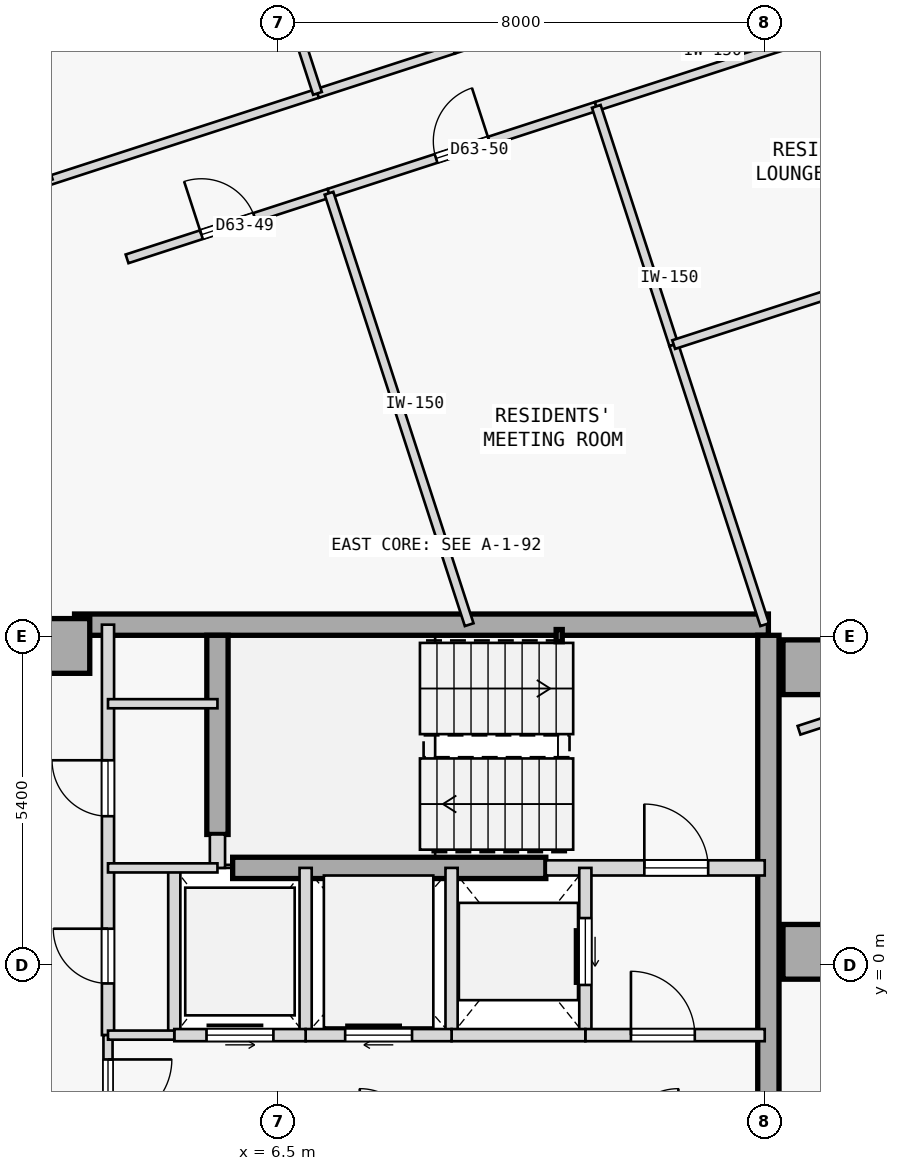
"""IFC4 building model, lengths in metres.
Left out: names, types, materials, properties, quantities, classifications, styles, units other than length and angle.
Written with IfcOpenShell. Run it as: python <this file> out.ifc"""

import sys

from ifc_helpers import new_model, si_unit, direction, frame, frame_2d, origin, origin_2d, place, context, subcontext, project, spatial, rectangle, hollow_rectangle, extrude, element, fill, save


model = new_model("IFC4")
c1 = context("Model", 3, precision=1e-05, world=origin(), true_north=direction((0.0, 1.0)))
c2 = subcontext(c1, "Body", "Model", "MODEL_VIEW")
j1 = project(units=[si_unit("LENGTHUNIT", "METRE"), si_unit("PLANEANGLEUNIT", "RADIAN")], contexts=[c1])
p1 = place(None, origin())
s1 = spatial("IfcSite", under=j1, at=p1, CompositionType="ELEMENT")
p2 = place(p1, origin())
s2 = spatial("IfcBuilding", under=s1, at=p2, CompositionType="ELEMENT")
p3 = place(p2, frame((0.0, 0.0, 237.7)))
s3 = spatial("IfcBuildingStorey", under=s2, at=p3, CompositionType="ELEMENT", Elevation=237.7)
for number, where, z_axis, x_axis in (
    (1, (15.25, 4.9, 0.0), (0.0, 0.0, 1.0), (1.0, 0.0, 0.0)),
    (2, (15.25, 0.22, 0.0), (0.0, 0.0, 1.0), (1.0, 0.0, 0.0)),
    (3, (2.95, 5.25, 0.0), (0.0, 0.0, 1.0), (1.0, 0.0, 0.0)),
):
    element("IfcColumn", number, at=place(p3, frame(where, z_axis=z_axis, x_axis=x_axis)), inside=s3, PredefinedType="COLUMN", context=c2, shape_type="SweptSolid", body=[
        extrude(rectangle(XDim=0.9, YDim=0.9, at=origin_2d()), origin(), (0.0, 0.0, 1.0), 3.35),
    ])
p4 = place(p3, frame((3.15, 5.6, 0.0), z_axis=(0.0, 0.0, 1.0), x_axis=(1.0, 0.0, 0.0)))
e4 = element("IfcWall", 4, at=p4, inside=s3, PredefinedType="SHEAR", context=c2, shape_type="SweptSolid", body=[
    extrude(rectangle(XDim=11.41, YDim=0.35, at=frame_2d((5.705, 0.0))), origin(), (0.0, 0.0, 1.0), 3.125),
])
p5 = place(p3, frame((14.56, -5.425, 0.0), z_axis=(0.0, 0.0, 1.0), x_axis=(0.0, 1.0, 0.0)))
e5 = element("IfcWall", 5, at=p5, inside=s3, PredefinedType="SHEAR", context=c2, shape_type="SweptSolid", body=[
    extrude(rectangle(XDim=10.85, YDim=0.35, at=frame_2d((5.425, 0.0))), origin(), (0.0, 0.0, 1.0), 3.125),
])
p6 = place(p3, frame((5.5, 2.15, 0.0), z_axis=(0.0, 0.0, 1.0), x_axis=(0.0, 1.0, 0.0)))
e6 = element("IfcWall", 6, at=p6, inside=s3, PredefinedType="SHEAR", context=c2, shape_type="SweptSolid", body=[
    extrude(rectangle(XDim=3.275, YDim=0.35, at=frame_2d((1.638, 0.0))), origin(), (0.0, 0.0, 1.0), 3.125),
])
p7 = place(p3, frame((5.75, 1.6, 0.0), z_axis=(0.0, 0.0, 1.0), x_axis=(1.0, 0.0, 0.0)))
e7 = element("IfcWall", 7, at=p7, inside=s3, PredefinedType="SHEAR", context=c2, shape_type="SweptSolid", body=[
    extrude(rectangle(XDim=5.15, YDim=0.35, at=frame_2d((2.575, 0.0))), origin(), (0.0, 0.0, 1.0), 3.125),
])
p8 = place(p3, frame((11.12, 5.42, 0.0), z_axis=(0.0, 0.0, 1.0), x_axis=(1.0, 0.0, 0.0)))
e8 = element("IfcColumn", 8, at=p8, inside=s3, PredefinedType="COLUMN", context=c2, shape_type="SweptSolid", body=[
    extrude(hollow_rectangle(XDim=0.1, YDim=0.2, WallThickness=0.008, at=origin_2d()), origin(), (0.0, 0.0, 1.0), 3.35),
])
p9 = place(p3, frame((10.9, 1.6, 0.0), z_axis=(0.0, 0.0, 1.0), x_axis=(1.0, 0.0, 0.0)))
e9 = element("IfcWall", 9, at=p9, inside=s3, PredefinedType="STANDARD", context=c2, shape_type="SweptSolid", body=[
    extrude(rectangle(XDim=3.6, YDim=0.25, at=frame_2d((1.8, 0.0))), origin(), (0.0, 0.0, 1.0), 3.125),
])
p10 = place(p9, frame((1.62, 0.0, 0.0)))
e10 = element("IfcOpeningElement", 10, at=p10, cuts=e9, PredefinedType="OPENING", context=c2, shape_type="SweptSolid", body=[
    extrude(rectangle(XDim=1.05, YDim=2.15, at=frame_2d((0.525, 1.075))), frame((0.0, 0.135, 0.0), z_axis=(0.0, -1.0, 0.0), x_axis=(1.0, 0.0, 0.0)), (0.0, 0.0, 1.0), 0.27),
])
p11 = place(p3, frame((5.5, 1.6, 0.0), z_axis=(0.0, 0.0, 1.0), x_axis=(0.0, 1.0, 0.0)))
e11 = element("IfcWall", 11, at=p11, inside=s3, PredefinedType="STANDARD", context=c2, shape_type="SweptSolid", body=[
    extrude(rectangle(XDim=0.55, YDim=0.25, at=frame_2d((0.275, 0.0))), origin(), (0.0, 0.0, 1.0), 3.125),
])
p12 = place(p3, frame((3.7, -1.15, 0.0), z_axis=(0.0, 0.0, 1.0), x_axis=(0.0, 1.0, 0.0)))
e12 = element("IfcWall", 12, at=p12, inside=s3, PredefinedType="STANDARD", context=c2, shape_type="SweptSolid", body=[
    extrude(rectangle(XDim=6.75, YDim=0.2, at=frame_2d((3.375, 0.0))), origin(), (0.0, 0.0, 1.0), 3.125),
])
p13 = place(p12, frame((3.6, 0.0, 0.0)))
e13 = element("IfcOpeningElement", 13, at=p13, cuts=e12, PredefinedType="OPENING", context=c2, shape_type="SweptSolid", body=[
    extrude(rectangle(XDim=0.92, YDim=2.15, at=frame_2d((0.46, 1.075))), frame((0.0, 0.11, 0.0), z_axis=(0.0, -1.0, 0.0), x_axis=(1.0, 0.0, 0.0)), (0.0, 0.0, 1.0), 0.22),
])
p14 = place(p12, frame((0.85, 0.0, 0.0)))
e14 = element("IfcOpeningElement", 14, at=p14, cuts=e12, PredefinedType="OPENING", context=c2, shape_type="SweptSolid", body=[
    extrude(rectangle(XDim=0.9, YDim=2.15, at=frame_2d((0.45, 1.075))), frame((0.0, 0.11, 0.0), z_axis=(0.0, -1.0, 0.0), x_axis=(1.0, 0.0, 0.0)), (0.0, 0.0, 1.0), 0.22),
])
p15 = place(p3, frame((3.7, -2.95, 0.0), z_axis=(0.0, 0.0, 1.0), x_axis=(0.0, 1.0, 0.0)))
e15 = element("IfcWall", 15, at=p15, inside=s3, PredefinedType="PARTITIONING", context=c2, shape_type="SweptSolid", body=[
    extrude(rectangle(XDim=1.8, YDim=0.15, at=frame_2d((0.9, 0.0))), origin(), (0.0, 0.0, 1.0), 3.125),
])
p16 = place(p15, frame((0.35, 0.0, 0.0)))
e16 = element("IfcOpeningElement", 16, at=p16, cuts=e15, PredefinedType="OPENING", context=c2, shape_type="SweptSolid", body=[
    extrude(rectangle(XDim=1.05, YDim=2.18, at=frame_2d((0.525, 1.09))), frame((0.0, 0.085, 0.0), z_axis=(0.0, -1.0, 0.0), x_axis=(1.0, 0.0, 0.0)), (0.0, 0.0, 1.0), 0.17),
])
p17 = place(p3, frame((11.55, -1.15, 0.0), z_axis=(0.0, 0.0, 1.0), x_axis=(0.0, 1.0, 0.0)))
e17 = element("IfcWall", 17, at=p17, inside=s3, PredefinedType="STANDARD", context=c2, shape_type="SweptSolid", body=[
    extrude(rectangle(XDim=2.75, YDim=0.2, at=frame_2d((1.375, 0.0))), origin(), (0.0, 0.0, 1.0), 3.125),
])
p18 = place(p17, frame((0.825, 0.0, 0.0)))
e18 = element("IfcOpeningElement", 18, at=p18, cuts=e17, PredefinedType="OPENING", context=c2, shape_type="SweptSolid", body=[
    extrude(rectangle(XDim=1.1, YDim=2.15, at=frame_2d((0.55, 1.075))), frame((0.0, 0.11, 0.0), z_axis=(0.0, -1.0, 0.0), x_axis=(1.0, 0.0, 0.0)), (0.0, 0.0, 1.0), 0.22),
])
p19 = place(p3, frame((9.35, -1.15, 0.0), z_axis=(0.0, 0.0, 1.0), x_axis=(0.0, 1.0, 0.0)))
e19 = element("IfcWall", 19, at=p19, inside=s3, PredefinedType="STANDARD", context=c2, shape_type="SweptSolid", body=[
    extrude(rectangle(XDim=2.75, YDim=0.2, at=frame_2d((1.375, 0.0))), origin(), (0.0, 0.0, 1.0), 3.125),
])
p20 = place(p3, frame((11.55, -1.15, 0.0), z_axis=(0.0, 0.0, 1.0), x_axis=(1.0, 0.0, 0.0)))
e20 = element("IfcWall", 20, at=p20, inside=s3, PredefinedType="STANDARD", context=c2, shape_type="SweptSolid", body=[
    extrude(rectangle(XDim=2.95, YDim=0.2, at=frame_2d((1.475, 0.0))), origin(), (0.0, 0.0, 1.0), 3.125),
])
p21 = place(p20, frame((0.75, 0.0, 0.0)))
e21 = element("IfcOpeningElement", 21, at=p21, cuts=e20, PredefinedType="OPENING", context=c2, shape_type="SweptSolid", body=[
    extrude(rectangle(XDim=1.05, YDim=2.18, at=frame_2d((0.525, 1.09))), frame((0.0, 0.11, 0.0), z_axis=(0.0, -1.0, 0.0), x_axis=(1.0, 0.0, 0.0)), (0.0, 0.0, 1.0), 0.22),
])
p22 = place(p3, frame((9.35, -1.15, 0.0), z_axis=(0.0, 0.0, 1.0), x_axis=(1.0, 0.0, 0.0)))
e22 = element("IfcWall", 22, at=p22, inside=s3, PredefinedType="STANDARD", context=c2, shape_type="SweptSolid", body=[
    extrude(rectangle(XDim=2.2, YDim=0.2, at=frame_2d((1.1, 0.0))), origin(), (0.0, 0.0, 1.0), 3.125),
])
p23 = place(p3, frame((6.95, -1.15, 0.0), z_axis=(0.0, 0.0, 1.0), x_axis=(0.0, 1.0, 0.0)))
e23 = element("IfcWall", 23, at=p23, inside=s3, PredefinedType="STANDARD", context=c2, shape_type="SweptSolid", body=[
    extrude(rectangle(XDim=2.75, YDim=0.2, at=frame_2d((1.375, 0.0))), origin(), (0.0, 0.0, 1.0), 3.125),
])
p24 = place(p3, frame((6.95, -1.15, 0.0), z_axis=(0.0, 0.0, 1.0), x_axis=(1.0, 0.0, 0.0)))
e24 = element("IfcWall", 24, at=p24, inside=s3, PredefinedType="STANDARD", context=c2, shape_type="SweptSolid", body=[
    extrude(rectangle(XDim=2.4, YDim=0.2, at=frame_2d((1.2, 0.0))), origin(), (0.0, 0.0, 1.0), 3.125),
])
p25 = place(p24, frame((0.65, 0.0, 0.0)))
e25 = element("IfcOpeningElement", 25, at=p25, cuts=e24, PredefinedType="OPENING", context=c2, shape_type="SweptSolid", body=[
    extrude(rectangle(XDim=1.1, YDim=2.15, at=frame_2d((0.55, 1.075))), frame((0.0, 0.11, 0.0), z_axis=(0.0, -1.0, 0.0), x_axis=(1.0, 0.0, 0.0)), (0.0, 0.0, 1.0), 0.22),
])
p26 = place(p3, frame((4.79, -1.15, 0.0), z_axis=(0.0, 0.0, 1.0), x_axis=(0.0, 1.0, 0.0)))
e26 = element("IfcWall", 26, at=p26, inside=s3, PredefinedType="STANDARD", context=c2, shape_type="SweptSolid", body=[
    extrude(rectangle(XDim=2.75, YDim=0.2, at=frame_2d((1.375, 0.0))), origin(), (0.0, 0.0, 1.0), 3.125),
])
p27 = place(p3, frame((4.79, -1.15, 0.0), z_axis=(0.0, 0.0, 1.0), x_axis=(1.0, 0.0, 0.0)))
e27 = element("IfcWall", 27, at=p27, inside=s3, PredefinedType="STANDARD", context=c2, shape_type="SweptSolid", body=[
    extrude(rectangle(XDim=2.16, YDim=0.2, at=frame_2d((1.08, 0.0))), origin(), (0.0, 0.0, 1.0), 3.125),
])
p28 = place(p27, frame((0.53, 0.0, 0.0)))
e28 = element("IfcOpeningElement", 28, at=p28, cuts=e27, PredefinedType="OPENING", context=c2, shape_type="SweptSolid", body=[
    extrude(rectangle(XDim=1.1, YDim=2.15, at=frame_2d((0.55, 1.075))), frame((0.0, 0.11, 0.0), z_axis=(0.0, -1.0, 0.0), x_axis=(1.0, 0.0, 0.0)), (0.0, 0.0, 1.0), 0.22),
])
p29 = place(p3, frame((3.7, -1.15, 0.0), z_axis=(0.0, 0.0, 1.0), x_axis=(1.0, 0.0, 0.0)))
e29 = element("IfcWall", 29, at=p29, inside=s3, PredefinedType="PARTITIONING", context=c2, shape_type="SweptSolid", body=[
    extrude(rectangle(XDim=1.09, YDim=0.15, at=frame_2d((0.545, 0.0))), origin(), (0.0, 0.0, 1.0), 3.125),
])
for number, where, z_axis, x_axis in (
    (30, (3.7, 4.3, 0.0), (0.0, 0.0, 1.0), (1.0, 0.0, 0.0)),
    (31, (3.7, 1.6, 0.0), (0.0, 0.0, 1.0), (1.0, 0.0, 0.0)),
):
    element("IfcWall", number, at=place(p3, frame(where, z_axis=z_axis, x_axis=x_axis)), inside=s3, PredefinedType="PARTITIONING", context=c2, shape_type="SweptSolid", body=[
        extrude(rectangle(XDim=1.8, YDim=0.15, at=frame_2d((0.9, 0.0))), origin(), (0.0, 0.0, 1.0), 3.125),
    ])
p30 = place(p3, frame((2.719, 12.898, 0.0), z_axis=(0.0, 0.0, 1.0), x_axis=(0.951053341802, 0.309026764289, 0.0)))
e32 = element("IfcWall", 32, at=p30, inside=s3, PredefinedType="PARTITIONING", context=c2, shape_type="SweptSolid", body=[
    extrude(rectangle(XDim=4.654, YDim=0.15, at=frame_2d((2.327, 0.0))), origin(), (0.0, 0.0, 1.0), 3.125),
])
p31 = place(p3, frame((7.145, 14.337, 0.0), z_axis=(0.0, 0.0, 1.0), x_axis=(0.951045519245, 0.309050837767, 0.0)))
e33 = element("IfcWall", 33, at=p31, inside=s3, PredefinedType="PARTITIONING", context=c2, shape_type="SweptSolid", body=[
    extrude(rectangle(XDim=2.35, YDim=0.15, at=frame_2d((1.175, 0.0))), origin(), (0.0, 0.0, 1.0), 3.125),
])
p32 = place(p3, frame((9.38, 15.063, 0.0), z_axis=(0.0, 0.0, 1.0), x_axis=(0.951069122051, 0.308978195154, 0.0)))
e34 = element("IfcWall", 34, at=p32, inside=s3, PredefinedType="PARTITIONING", context=c2, shape_type="SweptSolid", body=[
    extrude(rectangle(XDim=4.35, YDim=0.15, at=frame_2d((2.175, 0.0))), origin(), (0.0, 0.0, 1.0), 3.125),
])
p33 = place(p3, frame((4.013, 11.616, 0.0), z_axis=(0.0, 0.0, 1.0), x_axis=(0.951054104561, 0.309024416831, 0.0)))
e35 = element("IfcWall", 35, at=p33, inside=s3, PredefinedType="PARTITIONING", context=c2, shape_type="SweptSolid", body=[
    extrude(rectangle(XDim=3.492, YDim=0.15, at=frame_2d((1.746, 0.0))), origin(), (0.0, 0.0, 1.0), 3.125),
])
p34 = place(p33, frame((1.286, 0.0, 0.0)))
e36 = element("IfcOpeningElement", 36, at=p34, cuts=e35, PredefinedType="OPENING", context=c2, shape_type="SweptSolid", body=[
    extrude(rectangle(XDim=0.92, YDim=2.15, at=frame_2d((0.46, 1.075))), frame((0.0, 0.085, 0.0), z_axis=(0.0, -1.0, 0.0), x_axis=(1.0, 0.0, 0.0)), (0.0, 0.0, 1.0), 0.17),
])
p35 = place(p3, frame((7.334, 12.695, 0.0), z_axis=(0.0, 0.0, 1.0), x_axis=(0.951043772533, 0.30905621289, 0.0)))
e37 = element("IfcWall", 37, at=p35, inside=s3, PredefinedType="PARTITIONING", context=c2, shape_type="SweptSolid", body=[
    extrude(rectangle(XDim=4.622, YDim=0.15, at=frame_2d((2.311, 0.0))), origin(), (0.0, 0.0, 1.0), 3.125),
])
p36 = place(p35, frame((1.851, 0.0, 0.0)))
e38 = element("IfcOpeningElement", 38, at=p36, cuts=e37, PredefinedType="OPENING", context=c2, shape_type="SweptSolid", body=[
    extrude(rectangle(XDim=0.92, YDim=2.15, at=frame_2d((0.46, 1.075))), frame((0.0, 0.085, 0.0), z_axis=(0.0, -1.0, 0.0), x_axis=(1.0, 0.0, 0.0)), (0.0, 0.0, 1.0), 0.17),
])
p37 = place(p3, frame((11.73, 14.123, 0.0), z_axis=(0.0, 0.0, 1.0), x_axis=(0.951060263663, 0.309005460926, 0.0)))
e39 = element("IfcWall", 39, at=p37, inside=s3, PredefinedType="PARTITIONING", context=c2, shape_type="SweptSolid", body=[
    extrude(rectangle(XDim=12.327, YDim=0.15, at=frame_2d((6.164, 0.0))), origin(), (0.0, 0.0, 1.0), 3.125),
])
p38 = place(p37, frame((5.704, 0.0, 0.0)))
e40 = element("IfcOpeningElement", 40, at=p38, cuts=e39, PredefinedType="OPENING", context=c2, shape_type="SweptSolid", body=[
    extrude(rectangle(XDim=0.92, YDim=2.15, at=frame_2d((0.46, 1.075))), frame((0.0, 0.085, 0.0), z_axis=(0.0, -1.0, 0.0), x_axis=(1.0, 0.0, 0.0)), (0.0, 0.0, 1.0), 0.17),
])
p39 = place(p3, frame((2.719, 12.898, 0.0), z_axis=(0.0, 0.0, 1.0), x_axis=(-0.308998913866, 0.951062390819, 0.0)))
e41 = element("IfcWall", 41, at=p39, inside=s3, PredefinedType="PARTITIONING", context=c2, shape_type="SweptSolid", body=[
    extrude(rectangle(XDim=7.284, YDim=0.15, at=frame_2d((3.642, 0.0))), origin(), (0.0, 0.0, 1.0), 3.125),
])
p40 = place(p3, frame((7.145, 14.337, 0.0), z_axis=(0.0, 0.0, 1.0), x_axis=(-0.308948390121, 0.951078804433, 0.0)))
e42 = element("IfcWall", 42, at=p40, inside=s3, PredefinedType="PARTITIONING", context=c2, shape_type="SweptSolid", body=[
    extrude(rectangle(XDim=2.005, YDim=0.15, at=frame_2d((1.002, 0.0))), origin(), (0.0, 0.0, 1.0), 3.125),
])
p41 = place(p3, frame((9.64, 5.6, 0.0), z_axis=(0.0, 0.0, 1.0), x_axis=(-0.309012069377, 0.95105811651, 0.0)))
e43 = element("IfcWall", 43, at=p41, inside=s3, PredefinedType="PARTITIONING", context=c2, shape_type="SweptSolid", body=[
    extrude(rectangle(XDim=7.46, YDim=0.15, at=frame_2d((3.73, 0.0))), origin(), (0.0, 0.0, 1.0), 3.125),
])
p42 = place(p3, frame((14.5, 5.6, 0.0), z_axis=(0.0, 0.0, 1.0), x_axis=(-0.308974360462, 0.951070367837, 0.0)))
e44 = element("IfcWall", 44, at=p42, inside=s3, PredefinedType="PARTITIONING", context=c2, shape_type="SweptSolid", body=[
    extrude(rectangle(XDim=4.843, YDim=0.15, at=frame_2d((2.421, 0.0))), origin(), (0.0, 0.0, 1.0), 3.125),
])
p43 = place(p3, frame((13.003, 10.206, 0.0), z_axis=(0.0, 0.0, 1.0), x_axis=(-0.309035144366, 0.951050618814, 0.0)))
e45 = element("IfcWall", 45, at=p43, inside=s3, PredefinedType="PARTITIONING", context=c2, shape_type="SweptSolid", body=[
    extrude(rectangle(XDim=4.119, YDim=0.15, at=frame_2d((2.06, 0.0))), origin(), (0.0, 0.0, 1.0), 3.125),
])
p44 = place(p3, frame((15.064, 3.863, 0.0), z_axis=(0.0, 0.0, 1.0), x_axis=(0.951061448945, 0.309001812827, 0.0)))
e46 = element("IfcWall", 46, at=p44, inside=s3, PredefinedType="PARTITIONING", context=c2, shape_type="SweptSolid", body=[
    extrude(rectangle(XDim=10.352, YDim=0.15, at=frame_2d((5.176, 0.0))), origin(), (0.0, 0.0, 1.0), 3.125),
])
p45 = place(p44, frame((4.716, 0.0, 0.0)))
e47 = element("IfcOpeningElement", 47, at=p45, cuts=e46, PredefinedType="OPENING", context=c2, shape_type="SweptSolid", body=[
    extrude(rectangle(XDim=0.92, YDim=2.15, at=frame_2d((0.46, 1.075))), frame((0.0, 0.085, 0.0), z_axis=(0.0, -1.0, 0.0), x_axis=(1.0, 0.0, 0.0)), (0.0, 0.0, 1.0), 0.17),
])
p46 = place(p3, frame((13.003, 10.206, 0.0), z_axis=(0.0, 0.0, 1.0), x_axis=(0.951060263663, 0.309005460926, 0.0)))
e48 = element("IfcWall", 48, at=p46, inside=s3, PredefinedType="PARTITIONING", context=c2, shape_type="SweptSolid", body=[
    extrude(rectangle(XDim=12.327, YDim=0.15, at=frame_2d((6.164, 0.0))), origin(), (0.0, 0.0, 1.0), 2.675),
])
p47 = place(p10, origin())
e49 = element("IfcDoor", 49, at=p47, inside=s3, OperationType="SINGLE_SWING_LEFT", PredefinedType="DOOR", context=c2, shape_type="SweptSolid", body=[
    extrude(rectangle(XDim=1.05, YDim=2.15, at=frame_2d((0.525, 1.075))), frame((0.0, 0.025, 0.0), z_axis=(0.0, -1.0, 0.0), x_axis=(1.0, 0.0, 0.0)), (0.0, 0.0, 1.0), 0.05),
])
fill(e10, e49)
p48 = place(p21, origin())
e50 = element("IfcDoor", 50, at=p48, inside=s3, OperationType="SINGLE_SWING_LEFT", PredefinedType="DOOR", context=c2, shape_type="SweptSolid", body=[
    extrude(rectangle(XDim=1.05, YDim=2.18, at=frame_2d((0.525, 1.09))), frame((0.0, 0.025, 0.0), z_axis=(0.0, -1.0, 0.0), x_axis=(1.0, 0.0, 0.0)), (0.0, 0.0, 1.0), 0.05),
])
fill(e21, e50)
p49 = place(p16, frame((1.05, 0.0, 0.0), z_axis=(0.0, 0.0, 1.0), x_axis=(-1.0, 0.0, 0.0)))
e51 = element("IfcDoor", 51, at=p49, inside=s3, OperationType="SINGLE_SWING_RIGHT", PredefinedType="DOOR", context=c2, shape_type="SweptSolid", body=[
    extrude(rectangle(XDim=1.05, YDim=2.18, at=frame_2d((0.525, 1.09))), frame((0.0, 0.025, 0.0), z_axis=(0.0, -1.0, 0.0), x_axis=(1.0, 0.0, 0.0)), (0.0, 0.0, 1.0), 0.05),
])
fill(e16, e51)
p50 = place(p18, origin())
e52 = element("IfcDoor", 52, at=p50, inside=s3, OperationType="SLIDING_TO_RIGHT", PredefinedType="DOOR", context=c2, shape_type="SweptSolid", body=[
    extrude(rectangle(XDim=1.1, YDim=2.15, at=frame_2d((0.55, 1.075))), frame((0.0, 0.025, 0.0), z_axis=(0.0, -1.0, 0.0), x_axis=(1.0, 0.0, 0.0)), (0.0, 0.0, 1.0), 0.05),
])
fill(e18, e52)
p51 = place(p25, origin())
e53 = element("IfcDoor", 53, at=p51, inside=s3, OperationType="SLIDING_TO_RIGHT", PredefinedType="DOOR", context=c2, shape_type="SweptSolid", body=[
    extrude(rectangle(XDim=1.1, YDim=2.15, at=frame_2d((0.55, 1.075))), frame((0.0, 0.025, 0.0), z_axis=(0.0, -1.0, 0.0), x_axis=(1.0, 0.0, 0.0)), (0.0, 0.0, 1.0), 0.05),
])
fill(e25, e53)
p52 = place(p28, origin())
e54 = element("IfcDoor", 54, at=p52, inside=s3, OperationType="SLIDING_TO_LEFT", PredefinedType="DOOR", context=c2, shape_type="SweptSolid", body=[
    extrude(rectangle(XDim=1.1, YDim=2.15, at=frame_2d((0.55, 1.075))), frame((0.0, 0.025, 0.0), z_axis=(0.0, -1.0, 0.0), x_axis=(1.0, 0.0, 0.0)), (0.0, 0.0, 1.0), 0.05),
])
fill(e28, e54)
p53 = place(p13, origin())
e55 = element("IfcDoor", 55, at=p53, inside=s3, OperationType="SINGLE_SWING_RIGHT", PredefinedType="DOOR", context=c2, shape_type="SweptSolid", body=[
    extrude(rectangle(XDim=0.92, YDim=2.15, at=frame_2d((0.46, 1.075))), frame((0.0, 0.025, 0.0), z_axis=(0.0, -1.0, 0.0), x_axis=(1.0, 0.0, 0.0)), (0.0, 0.0, 1.0), 0.05),
])
fill(e13, e55)
p54 = place(p14, origin())
e56 = element("IfcDoor", 56, at=p54, inside=s3, OperationType="SINGLE_SWING_RIGHT", PredefinedType="DOOR", context=c2, shape_type="SweptSolid", body=[
    extrude(rectangle(XDim=0.9, YDim=2.15, at=frame_2d((0.45, 1.075))), frame((0.0, 0.025, 0.0), z_axis=(0.0, -1.0, 0.0), x_axis=(1.0, 0.0, 0.0)), (0.0, 0.0, 1.0), 0.05),
])
fill(e14, e56)
p55 = place(p34, origin())
e57 = element("IfcDoor", 57, at=p55, inside=s3, OperationType="SINGLE_SWING_LEFT", PredefinedType="DOOR", context=c2, shape_type="SweptSolid", body=[
    extrude(rectangle(XDim=0.92, YDim=2.15, at=frame_2d((0.46, 1.075))), frame((0.0, 0.025, 0.0), z_axis=(0.0, -1.0, 0.0), x_axis=(1.0, 0.0, 0.0)), (0.0, 0.0, 1.0), 0.05),
])
fill(e36, e57)
p56 = place(p36, origin())
e58 = element("IfcDoor", 58, at=p56, inside=s3, OperationType="SINGLE_SWING_RIGHT", PredefinedType="DOOR", context=c2, shape_type="SweptSolid", body=[
    extrude(rectangle(XDim=0.92, YDim=2.15, at=frame_2d((0.46, 1.075))), frame((0.0, 0.025, 0.0), z_axis=(0.0, -1.0, 0.0), x_axis=(1.0, 0.0, 0.0)), (0.0, 0.0, 1.0), 0.05),
])
fill(e38, e58)
save(model, sys.argv[1])
